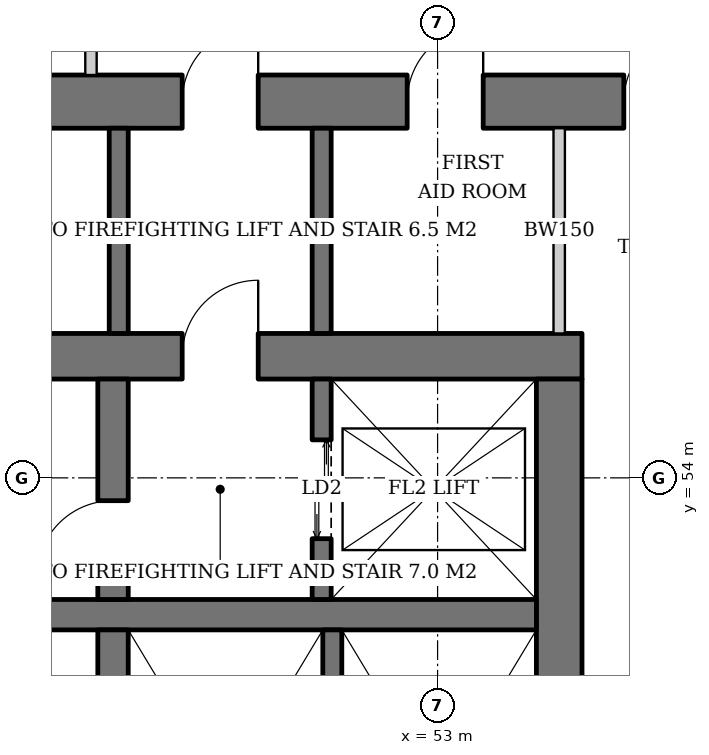
"""IFC4 building model, lengths in metres.
Left out: names, types, materials, properties, quantities, classifications, styles, units other than length and angle.
Written with IfcOpenShell. Run it as: python <this file> out.ifc"""

import sys

from ifc_helpers import new_model, si_unit, direction, frame, frame_2d, origin, place, context, subcontext, project, spatial, rectangle, extrude, element, fill, save


model = new_model("IFC4")
c1 = context("Model", 3, precision=1e-05, world=origin(), true_north=direction((0.0, 1.0)))
c2 = subcontext(c1, "Body", "Model", "MODEL_VIEW")
j1 = project(units=[si_unit("LENGTHUNIT", "METRE"), si_unit("PLANEANGLEUNIT", "RADIAN")], contexts=[c1])
p1 = place(None, origin())
s1 = spatial("IfcSite", under=j1, at=p1, CompositionType="ELEMENT")
p2 = place(p1, origin())
s2 = spatial("IfcBuilding", under=s1, at=p2, CompositionType="ELEMENT")
p3 = place(p2, frame((0.0, 0.0, 97.0)))
s3 = spatial("IfcBuildingStorey", under=s2, at=p3, CompositionType="ELEMENT", Elevation=97.0)
p4 = place(p3, frame((35.1, 55.6, 0.0), z_axis=(0.0, 0.0, 1.0), x_axis=(1.0, 0.0, 0.0)))
e1 = element("IfcWall", 1, at=p4, inside=s3, PredefinedType="SHEAR", context=c2, shape_type="SweptSolid", body=[
    extrude(rectangle(XDim=19.8, YDim=0.6, at=frame_2d((9.9, 0.0))), origin(), (0.0, 0.0, 1.0), 3.8),
])
p5 = place(p4, frame((14.54, 0.0, 0.0)))
e2 = element("IfcOpeningElement", 2, at=p5, cuts=e1, PredefinedType="OPENING", context=c2, shape_type="SweptSolid", body=[
    extrude(rectangle(XDim=1.0, YDim=2.1, at=frame_2d((0.5, 1.05))), frame((0.0, 0.31, 0.0), z_axis=(0.0, -1.0, 0.0), x_axis=(1.0, 0.0, 0.0)), (0.0, 0.0, 1.0), 0.62),
])
p6 = place(p4, frame((2.425, 0.0, 0.0)))
e3 = element("IfcOpeningElement", 3, at=p6, cuts=e1, PredefinedType="OPENING", context=c2, shape_type="SweptSolid", body=[
    extrude(rectangle(XDim=1.0, YDim=2.1, at=frame_2d((0.5, 1.05))), frame((0.0, 0.31, 0.0), z_axis=(0.0, -1.0, 0.0), x_axis=(1.0, 0.0, 0.0)), (0.0, 0.0, 1.0), 0.62),
])
p7 = place(p3, frame((54.6, 36.7, 0.0), z_axis=(0.0, 0.0, 1.0), x_axis=(0.0, 1.0, 0.0)))
e4 = element("IfcWall", 4, at=p7, inside=s3, PredefinedType="SHEAR", context=c2, shape_type="SweptSolid", body=[
    extrude(rectangle(XDim=18.6, YDim=0.6, at=frame_2d((9.3, 0.0))), origin(), (0.0, 0.0, 1.0), 3.8),
])
p8 = place(p7, frame((8.4, 0.0, 0.0)))
e5 = element("IfcOpeningElement", 5, at=p8, cuts=e4, PredefinedType="OPENING", context=c2, shape_type="SweptSolid", body=[
    extrude(rectangle(XDim=1.8, YDim=2.4, at=frame_2d((0.9, 1.2))), frame((0.0, 0.31, 0.0), z_axis=(0.0, -1.0, 0.0), x_axis=(1.0, 0.0, 0.0)), (0.0, 0.0, 1.0), 0.62),
])
p9 = place(p3, frame((31.7, 58.95, 0.0), z_axis=(0.0, 0.0, 1.0), x_axis=(1.0, 0.0, 0.0)))
e6 = element("IfcWall", 6, at=p9, inside=s3, PredefinedType="SHEAR", context=c2, shape_type="SweptSolid", body=[
    extrude(rectangle(XDim=26.6, YDim=0.7, at=frame_2d((13.3, 0.0))), origin(), (0.0, 0.0, 1.0), 3.8),
])
p10 = place(p9, frame((17.94, 0.0, 0.0)))
e7 = element("IfcOpeningElement", 7, at=p10, cuts=e6, PredefinedType="OPENING", context=c2, shape_type="SweptSolid", body=[
    extrude(rectangle(XDim=1.0, YDim=2.1, at=frame_2d((0.5, 1.05))), frame((0.0, 0.36, 0.0), z_axis=(0.0, -1.0, 0.0), x_axis=(1.0, 0.0, 0.0)), (0.0, 0.0, 1.0), 0.72),
])
p11 = place(p9, frame((5.825, 0.0, 0.0)))
e8 = element("IfcOpeningElement", 8, at=p11, cuts=e6, PredefinedType="OPENING", context=c2, shape_type="SweptSolid", body=[
    extrude(rectangle(XDim=1.0, YDim=2.1, at=frame_2d((0.5, 1.05))), frame((0.0, 0.36, 0.0), z_axis=(0.0, -1.0, 0.0), x_axis=(1.0, 0.0, 0.0)), (0.0, 0.0, 1.0), 0.72),
])
p12 = place(p9, frame((1.169, 0.0, 0.0)))
e9 = element("IfcOpeningElement", 9, at=p12, cuts=e6, PredefinedType="OPENING", context=c2, shape_type="SweptSolid", body=[
    extrude(rectangle(XDim=1.0, YDim=2.1, at=frame_2d((0.5, 1.05))), frame((0.0, 0.36, 0.0), z_axis=(0.0, -1.0, 0.0), x_axis=(1.0, 0.0, 0.0)), (0.0, 0.0, 1.0), 0.72),
])
p13 = place(p9, frame((3.447, 0.0, 0.0)))
e10 = element("IfcOpeningElement", 10, at=p13, cuts=e6, PredefinedType="OPENING", context=c2, shape_type="SweptSolid", body=[
    extrude(rectangle(XDim=1.0, YDim=2.1, at=frame_2d((0.5, 1.05))), frame((0.0, 0.36, 0.0), z_axis=(0.0, -1.0, 0.0), x_axis=(1.0, 0.0, 0.0)), (0.0, 0.0, 1.0), 0.72),
])
p14 = place(p9, frame((11.577, 0.0, 0.0)))
e11 = element("IfcOpeningElement", 11, at=p14, cuts=e6, PredefinedType="OPENING", context=c2, shape_type="SweptSolid", body=[
    extrude(rectangle(XDim=1.0, YDim=2.1, at=frame_2d((0.5, 1.05))), frame((0.0, 0.36, 0.0), z_axis=(0.0, -1.0, 0.0), x_axis=(1.0, 0.0, 0.0)), (0.0, 0.0, 1.0), 0.72),
])
p15 = place(p9, frame((20.9, 0.0, 0.0)))
e12 = element("IfcOpeningElement", 12, at=p15, cuts=e6, PredefinedType="OPENING", context=c2, shape_type="SweptSolid", body=[
    extrude(rectangle(XDim=1.0, YDim=2.1, at=frame_2d((0.5, 1.05))), frame((0.0, 0.36, 0.0), z_axis=(0.0, -1.0, 0.0), x_axis=(1.0, 0.0, 0.0)), (0.0, 0.0, 1.0), 0.72),
])
p16 = place(p9, frame((23.75, 0.0, 0.0)))
e13 = element("IfcOpeningElement", 13, at=p16, cuts=e6, PredefinedType="OPENING", context=c2, shape_type="SweptSolid", body=[
    extrude(rectangle(XDim=1.0, YDim=2.1, at=frame_2d((0.5, 1.05))), frame((0.0, 0.36, 0.0), z_axis=(0.0, -1.0, 0.0), x_axis=(1.0, 0.0, 0.0)), (0.0, 0.0, 1.0), 0.72),
])
p17 = place(p3, frame((35.7, 52.2, 0.0), z_axis=(0.0, 0.0, 1.0), x_axis=(1.0, 0.0, 0.0)))
e14 = element("IfcWall", 14, at=p17, inside=s3, PredefinedType="SHEAR", context=c2, shape_type="SweptSolid", body=[
    extrude(rectangle(XDim=18.6, YDim=0.4, at=frame_2d((9.3, 0.0))), origin(), (0.0, 0.0, 1.0), 3.8),
])
p18 = place(p3, frame((48.73, 40.0, 0.0), z_axis=(0.0, 0.0, 1.0), x_axis=(0.0, 1.0, 0.0)))
e15 = element("IfcWall", 15, at=p18, inside=s3, PredefinedType="SHEAR", context=c2, shape_type="SweptSolid", body=[
    extrude(rectangle(XDim=12.0, YDim=0.4, at=frame_2d((6.0, 0.0))), origin(), (0.0, 0.0, 1.0), 3.8),
])
p19 = place(p3, frame((48.73, 52.4, 0.0), z_axis=(0.0, 0.0, 1.0), x_axis=(0.0, 1.0, 0.0)))
e16 = element("IfcWall", 16, at=p19, inside=s3, PredefinedType="SHEAR", context=c2, shape_type="SweptSolid", body=[
    extrude(rectangle(XDim=2.9, YDim=0.4, at=frame_2d((1.45, 0.0))), origin(), (0.0, 0.0, 1.0), 3.8),
])
p20 = place(p19, frame((0.3, 0.0, 0.0)))
e17 = element("IfcOpeningElement", 17, at=p20, cuts=e16, PredefinedType="OPENING", context=c2, shape_type="SweptSolid", body=[
    extrude(rectangle(XDim=1.0, YDim=2.1, at=frame_2d((0.5, 1.05))), frame((0.0, 0.21, 0.0), z_axis=(0.0, -1.0, 0.0), x_axis=(1.0, 0.0, 0.0)), (0.0, 0.0, 1.0), 0.42),
])
p21 = place(p3, frame((51.475, 52.4, 0.0), z_axis=(0.0, 0.0, 1.0), x_axis=(0.0, 1.0, 0.0)))
e18 = element("IfcWall", 18, at=p21, inside=s3, PredefinedType="SHEAR", context=c2, shape_type="SweptSolid", body=[
    extrude(rectangle(XDim=2.9, YDim=0.25, at=frame_2d((1.45, 0.0))), origin(), (0.0, 0.0, 1.0), 3.8),
])
p22 = place(p21, frame((0.8, 0.0, 0.0)))
e19 = element("IfcOpeningElement", 19, at=p22, cuts=e18, PredefinedType="OPENING", context=c2, shape_type="SweptSolid", body=[
    extrude(rectangle(XDim=1.3, YDim=2.2, at=frame_2d((0.65, 1.1))), frame((0.0, 0.135, 0.0), z_axis=(0.0, -1.0, 0.0), x_axis=(1.0, 0.0, 0.0)), (0.0, 0.0, 1.0), 0.27),
])
p23 = place(p3, frame((51.615, 47.75, 0.0), z_axis=(0.0, 0.0, 1.0), x_axis=(0.0, 1.0, 0.0)))
e20 = element("IfcWall", 20, at=p23, inside=s3, PredefinedType="SHEAR", context=c2, shape_type="SweptSolid", body=[
    extrude(rectangle(XDim=4.25, YDim=0.25, at=frame_2d((2.125, 0.0))), origin(), (0.0, 0.0, 1.0), 3.8),
])
for number, where, z_axis, x_axis in (
    (21, (48.805, 55.9, 0.0), (0.0, 0.0, 1.0), (0.0, 1.0, 0.0)),
    (22, (51.475, 55.9, 0.0), (0.0, 0.0, 1.0), (0.0, 1.0, 0.0)),
):
    element("IfcWall", number, at=place(p3, frame(where, z_axis=z_axis, x_axis=x_axis)), inside=s3, PredefinedType="SOLIDWALL", context=c2, shape_type="SweptSolid", body=[
        extrude(rectangle(XDim=2.7, YDim=0.25, at=frame_2d((1.35, 0.0))), origin(), (0.0, 0.0, 1.0), 3.62),
    ])
p24 = place(p3, frame((54.6, 55.9, 0.0), z_axis=(0.0, 0.0, 1.0), x_axis=(0.0, 1.0, 0.0)))
e23 = element("IfcWall", 23, at=p24, inside=s3, PredefinedType="SOLIDWALL", context=c2, shape_type="SweptSolid", body=[
    extrude(rectangle(XDim=2.7, YDim=0.15, at=frame_2d((1.35, 0.0))), origin(), (0.0, 0.0, 1.0), 3.62),
])
p25 = place(p3, frame((48.44, 59.3, 0.0), z_axis=(0.0, 0.0, 1.0), x_axis=(0.0, 1.0, 0.0)))
e24 = element("IfcWall", 24, at=p25, inside=s3, PredefinedType="PARTITIONING", context=c2, shape_type="SweptSolid", body=[
    extrude(rectangle(XDim=2.325, YDim=0.15, at=frame_2d((1.163, 0.0))), origin(), (0.0, 0.0, 1.0), 3.62),
])
p26 = place(p22, origin())
e25 = element("IfcDoor", 25, at=p26, inside=s3, OperationType="DOUBLE_DOOR_SLIDING", PredefinedType="DOOR", context=c2, shape_type="SweptSolid", body=[
    extrude(rectangle(XDim=1.3, YDim=2.2, at=frame_2d((0.65, 1.1))), frame((0.0, 0.025, 0.0), z_axis=(0.0, -1.0, 0.0), x_axis=(1.0, 0.0, 0.0)), (0.0, 0.0, 1.0), 0.05),
])
fill(e19, e25)
p27 = place(p20, origin())
e26 = element("IfcDoor", 26, at=p27, inside=s3, OperationType="SINGLE_SWING_LEFT", PredefinedType="DOOR", context=c2, shape_type="SweptSolid", body=[
    extrude(rectangle(XDim=1.0, YDim=2.1, at=frame_2d((0.5, 1.05))), frame((0.0, 0.025, 0.0), z_axis=(0.0, -1.0, 0.0), x_axis=(1.0, 0.0, 0.0)), (0.0, 0.0, 1.0), 0.05),
])
fill(e17, e26)
p28 = place(p5, origin())
e27 = element("IfcDoor", 27, at=p28, inside=s3, OperationType="SINGLE_SWING_RIGHT", PredefinedType="DOOR", context=c2, shape_type="SweptSolid", body=[
    extrude(rectangle(XDim=1.0, YDim=2.1, at=frame_2d((0.5, 1.05))), frame((0.0, 0.025, 0.0), z_axis=(0.0, -1.0, 0.0), x_axis=(1.0, 0.0, 0.0)), (0.0, 0.0, 1.0), 0.05),
])
fill(e2, e27)
p29 = place(p10, origin())
e28 = element("IfcDoor", 28, at=p29, inside=s3, OperationType="SINGLE_SWING_RIGHT", PredefinedType="DOOR", context=c2, shape_type="SweptSolid", body=[
    extrude(rectangle(XDim=1.0, YDim=2.1, at=frame_2d((0.5, 1.05))), frame((0.0, 0.025, 0.0), z_axis=(0.0, -1.0, 0.0), x_axis=(1.0, 0.0, 0.0)), (0.0, 0.0, 1.0), 0.05),
])
fill(e7, e28)
p30 = place(p15, origin())
e29 = element("IfcDoor", 29, at=p30, inside=s3, OperationType="SINGLE_SWING_RIGHT", PredefinedType="DOOR", context=c2, shape_type="SweptSolid", body=[
    extrude(rectangle(XDim=1.0, YDim=2.1, at=frame_2d((0.5, 1.05))), frame((0.0, -0.29, 0.0), z_axis=(0.0, -1.0, 0.0), x_axis=(1.0, 0.0, 0.0)), (0.0, 0.0, 1.0), 0.05),
])
fill(e12, e29)
p31 = place(p16, origin())
e30 = element("IfcDoor", 30, at=p31, inside=s3, OperationType="SINGLE_SWING_RIGHT", PredefinedType="DOOR", context=c2, shape_type="SweptSolid", body=[
    extrude(rectangle(XDim=1.0, YDim=2.1, at=frame_2d((0.5, 1.05))), frame((0.0, -0.29, 0.0), z_axis=(0.0, -1.0, 0.0), x_axis=(1.0, 0.0, 0.0)), (0.0, 0.0, 1.0), 0.05),
])
fill(e13, e30)
save(model, sys.argv[1])
